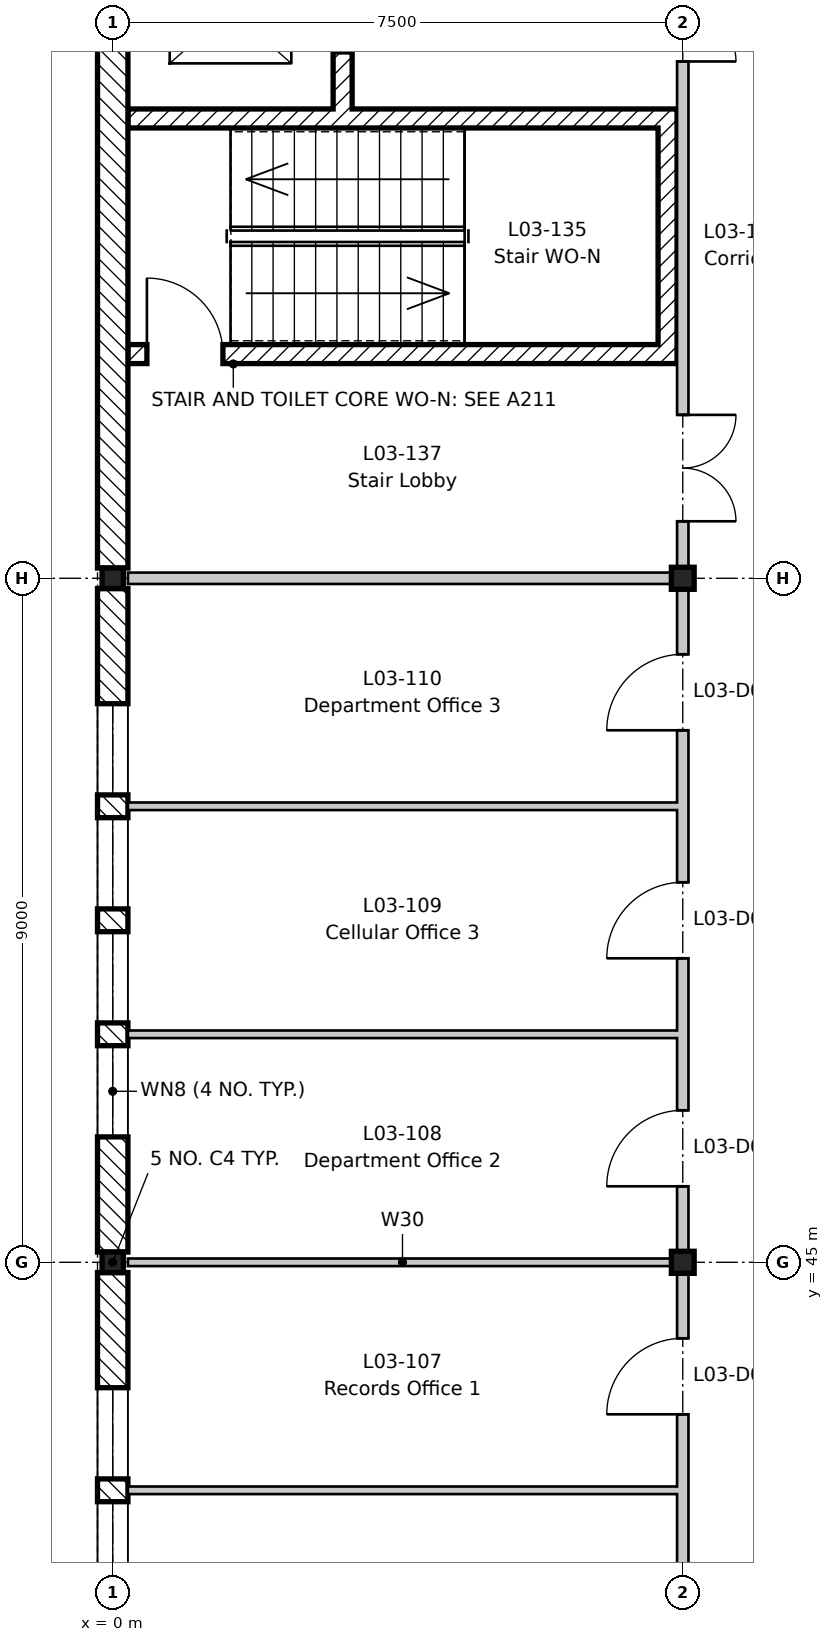
"""IFC4 building model, lengths in metres.
Left out: names, types, materials, properties, quantities, classifications, styles, units other than length and angle.
Written with IfcOpenShell. Run it as: python <this file> out.ifc"""

import sys

from ifc_helpers import new_model, si_unit, direction, frame, frame_2d, origin, origin_2d, place, context, subcontext, project, spatial, rectangle, i_section, extrude, element, fill, save


model = new_model("IFC4")
c1 = context("Model", 3, precision=1e-05, world=origin(), true_north=direction((0.0, 1.0)))
c2 = subcontext(c1, "Body", "Model", "MODEL_VIEW")
j1 = project(units=[si_unit("LENGTHUNIT", "METRE"), si_unit("PLANEANGLEUNIT", "RADIAN")], contexts=[c1])
p1 = place(None, origin())
s1 = spatial("IfcSite", under=j1, at=p1, CompositionType="ELEMENT")
p2 = place(p1, origin())
s2 = spatial("IfcBuilding", under=s1, at=p2, CompositionType="ELEMENT")
p3 = place(p2, frame((0.0, 0.0, 14.4)))
s3 = spatial("IfcBuildingStorey", under=s2, at=p3, CompositionType="ELEMENT", Elevation=14.4)
for number, where, z_axis, x_axis in (
    (1, (0.0, 45.0, -0.2), (0.0, 0.0, 1.0), (1.0, 0.0, 0.0)),
    (2, (0.0, 54.0, -0.2), (0.0, 0.0, 1.0), (1.0, 0.0, 0.0)),
):
    element("IfcColumn", number, at=place(p3, frame(where, z_axis=z_axis, x_axis=x_axis)), inside=s3, PredefinedType="COLUMN", context=c2, shape_type="SweptSolid", body=[
        extrude(i_section(OverallWidth=0.28, OverallDepth=0.27, WebThickness=0.008, FlangeThickness=0.013, FilletRadius=0.024, at=origin_2d()), origin(), (0.0, 0.0, 1.0), 4.2),
    ])
for number, where, z_axis, x_axis in (
    (3, (7.5, 45.0, -0.2), (0.0, 0.0, 1.0), (1.0, 0.0, 0.0)),
    (4, (7.5, 54.0, -0.2), (0.0, 0.0, 1.0), (1.0, 0.0, 0.0)),
):
    element("IfcColumn", number, at=place(p3, frame(where, z_axis=z_axis, x_axis=x_axis)), inside=s3, PredefinedType="COLUMN", context=c2, shape_type="SweptSolid", body=[
        extrude(i_section(OverallWidth=0.3, OverallDepth=0.29, WebThickness=0.009, FlangeThickness=0.014, FilletRadius=0.027, at=origin_2d()), origin(), (0.0, 0.0, 1.0), 4.2),
    ])
p4 = place(p3, frame((0.2, 56.95, 0.0), z_axis=(0.0, 0.0, 1.0), x_axis=(1.0, 0.0, 0.0)))
e5 = element("IfcWall", 5, at=p4, inside=s3, PredefinedType="SHEAR", context=c2, shape_type="SweptSolid", body=[
    extrude(rectangle(XDim=7.225, YDim=0.25, at=frame_2d((3.613, 0.0))), origin(), (0.0, 0.0, 1.0), 4.0),
])
p5 = place(p4, frame((0.25, 0.0, 0.0)))
e6 = element("IfcOpeningElement", 6, at=p5, cuts=e5, PredefinedType="OPENING", context=c2, shape_type="SweptSolid", body=[
    extrude(rectangle(XDim=1.0, YDim=2.1, at=frame_2d((0.5, 1.05))), frame((0.0, 0.135, 0.0), z_axis=(0.0, -1.0, 0.0), x_axis=(1.0, 0.0, 0.0)), (0.0, 0.0, 1.0), 0.27),
])
p6 = place(p3, frame((0.2, 60.05, 0.0), z_axis=(0.0, 0.0, 1.0), x_axis=(1.0, 0.0, 0.0)))
e7 = element("IfcWall", 7, at=p6, inside=s3, PredefinedType="SHEAR", context=c2, shape_type="SweptSolid", body=[
    extrude(rectangle(XDim=7.225, YDim=0.25, at=frame_2d((3.613, 0.0))), origin(), (0.0, 0.0, 1.0), 4.0),
])
p7 = place(p3, frame((7.3, 57.075, 0.0), z_axis=(0.0, 0.0, 1.0), x_axis=(0.0, 1.0, 0.0)))
e8 = element("IfcWall", 8, at=p7, inside=s3, PredefinedType="SHEAR", context=c2, shape_type="SweptSolid", body=[
    extrude(rectangle(XDim=2.85, YDim=0.25, at=frame_2d((1.425, 0.0))), origin(), (0.0, 0.0, 1.0), 4.0),
])
p8 = place(p3, frame((3.025, 60.175, 0.0), z_axis=(0.0, 0.0, 1.0), x_axis=(0.0, 1.0, 0.0)))
e9 = element("IfcWall", 9, at=p8, inside=s3, PredefinedType="SHEAR", context=c2, shape_type="SweptSolid", body=[
    extrude(rectangle(XDim=2.6, YDim=0.25, at=frame_2d((1.3, 0.0))), origin(), (0.0, 0.0, 1.0), 4.0),
])
p9 = place(p8, frame((0.75, 0.0, 0.0)))
e10 = element("IfcOpeningElement", 10, at=p9, cuts=e9, PredefinedType="OPENING", context=c2, shape_type="SweptSolid", body=[
    extrude(rectangle(XDim=1.1, YDim=2.1, at=frame_2d((0.55, 1.05))), frame((0.0, 0.135, 0.0), z_axis=(0.0, -1.0, 0.0), x_axis=(1.0, 0.0, 0.0)), (0.0, 0.0, 1.0), 0.27),
])
p10 = place(p3, frame((0.0, 36.135, 0.0), z_axis=(0.0, 0.0, 1.0), x_axis=(0.0, 1.0, 0.0)))
e11 = element("IfcWall", 11, at=p10, inside=s3, PredefinedType="STANDARD", context=c2, shape_type="SweptSolid", body=[
    extrude(rectangle(XDim=8.73, YDim=0.4, at=frame_2d((4.365, 0.0))), origin(), (0.0, 0.0, 1.0), 3.6),
])
p11 = place(p10, frame((1.515, 0.0, 0.6)))
e12 = element("IfcOpeningElement", 12, at=p11, cuts=e11, PredefinedType="OPENING", context=c2, shape_type="SweptSolid", body=[
    extrude(rectangle(XDim=1.2, YDim=2.7, at=frame_2d((0.6, 1.35))), frame((0.0, 0.21, 0.0), z_axis=(0.0, -1.0, 0.0), x_axis=(1.0, 0.0, 0.0)), (0.0, 0.0, 1.0), 0.42),
])
p12 = place(p10, frame((3.015, 0.0, 0.6)))
e13 = element("IfcOpeningElement", 13, at=p12, cuts=e11, PredefinedType="OPENING", context=c2, shape_type="SweptSolid", body=[
    extrude(rectangle(XDim=1.2, YDim=2.7, at=frame_2d((0.6, 1.35))), frame((0.0, 0.21, 0.0), z_axis=(0.0, -1.0, 0.0), x_axis=(1.0, 0.0, 0.0)), (0.0, 0.0, 1.0), 0.42),
])
p13 = place(p10, frame((4.515, 0.0, 0.6)))
e14 = element("IfcOpeningElement", 14, at=p13, cuts=e11, PredefinedType="OPENING", context=c2, shape_type="SweptSolid", body=[
    extrude(rectangle(XDim=1.2, YDim=2.7, at=frame_2d((0.6, 1.35))), frame((0.0, 0.21, 0.0), z_axis=(0.0, -1.0, 0.0), x_axis=(1.0, 0.0, 0.0)), (0.0, 0.0, 1.0), 0.42),
])
p14 = place(p10, frame((6.015, 0.0, 0.6)))
e15 = element("IfcOpeningElement", 15, at=p14, cuts=e11, PredefinedType="OPENING", context=c2, shape_type="SweptSolid", body=[
    extrude(rectangle(XDim=1.2, YDim=2.7, at=frame_2d((0.6, 1.35))), frame((0.0, 0.21, 0.0), z_axis=(0.0, -1.0, 0.0), x_axis=(1.0, 0.0, 0.0)), (0.0, 0.0, 1.0), 0.42),
])
p15 = place(p3, frame((0.0, 45.135, 0.0), z_axis=(0.0, 0.0, 1.0), x_axis=(0.0, 1.0, 0.0)))
e16 = element("IfcWall", 16, at=p15, inside=s3, PredefinedType="STANDARD", context=c2, shape_type="SweptSolid", body=[
    extrude(rectangle(XDim=8.73, YDim=0.4, at=frame_2d((4.365, 0.0))), origin(), (0.0, 0.0, 1.0), 3.6),
])
p16 = place(p15, frame((1.515, 0.0, 0.6)))
e17 = element("IfcOpeningElement", 17, at=p16, cuts=e16, PredefinedType="OPENING", context=c2, shape_type="SweptSolid", body=[
    extrude(rectangle(XDim=1.2, YDim=2.7, at=frame_2d((0.6, 1.35))), frame((0.0, 0.21, 0.0), z_axis=(0.0, -1.0, 0.0), x_axis=(1.0, 0.0, 0.0)), (0.0, 0.0, 1.0), 0.42),
])
p17 = place(p15, frame((3.015, 0.0, 0.6)))
e18 = element("IfcOpeningElement", 18, at=p17, cuts=e16, PredefinedType="OPENING", context=c2, shape_type="SweptSolid", body=[
    extrude(rectangle(XDim=1.2, YDim=2.7, at=frame_2d((0.6, 1.35))), frame((0.0, 0.21, 0.0), z_axis=(0.0, -1.0, 0.0), x_axis=(1.0, 0.0, 0.0)), (0.0, 0.0, 1.0), 0.42),
])
p18 = place(p15, frame((4.515, 0.0, 0.6)))
e19 = element("IfcOpeningElement", 19, at=p18, cuts=e16, PredefinedType="OPENING", context=c2, shape_type="SweptSolid", body=[
    extrude(rectangle(XDim=1.2, YDim=2.7, at=frame_2d((0.6, 1.35))), frame((0.0, 0.21, 0.0), z_axis=(0.0, -1.0, 0.0), x_axis=(1.0, 0.0, 0.0)), (0.0, 0.0, 1.0), 0.42),
])
p19 = place(p15, frame((6.015, 0.0, 0.6)))
e20 = element("IfcOpeningElement", 20, at=p19, cuts=e16, PredefinedType="OPENING", context=c2, shape_type="SweptSolid", body=[
    extrude(rectangle(XDim=1.2, YDim=2.7, at=frame_2d((0.6, 1.35))), frame((0.0, 0.21, 0.0), z_axis=(0.0, -1.0, 0.0), x_axis=(1.0, 0.0, 0.0)), (0.0, 0.0, 1.0), 0.42),
])
p20 = place(p3, frame((0.0, 54.135, 0.0), z_axis=(0.0, 0.0, 1.0), x_axis=(0.0, 1.0, 0.0)))
e21 = element("IfcWall", 21, at=p20, inside=s3, PredefinedType="STANDARD", context=c2, shape_type="SweptSolid", body=[
    extrude(rectangle(XDim=8.73, YDim=0.4, at=frame_2d((4.365, 0.0))), origin(), (0.0, 0.0, 1.0), 3.6),
])
p21 = place(p3, frame((0.2, 42.0, 0.0), z_axis=(0.0, 0.0, 1.0), x_axis=(1.0, 0.0, 0.0)))
e22 = element("IfcWall", 22, at=p21, inside=s3, PredefinedType="PARTITIONING", context=c2, shape_type="SweptSolid", body=[
    extrude(rectangle(XDim=7.225, YDim=0.1, at=frame_2d((3.613, 0.0))), origin(), (0.0, 0.0, 1.0), 4.0),
])
p22 = place(p3, frame((0.2, 45.0, 0.0), z_axis=(0.0, 0.0, 1.0), x_axis=(1.0, 0.0, 0.0)))
e23 = element("IfcWall", 23, at=p22, inside=s3, PredefinedType="PARTITIONING", context=c2, shape_type="SweptSolid", body=[
    extrude(rectangle(XDim=7.225, YDim=0.1, at=frame_2d((3.613, 0.0))), origin(), (0.0, 0.0, 1.0), 3.65),
])
for number, where, z_axis, x_axis in (
    (24, (0.2, 48.0, 0.0), (0.0, 0.0, 1.0), (1.0, 0.0, 0.0)),
    (25, (0.2, 51.0, 0.0), (0.0, 0.0, 1.0), (1.0, 0.0, 0.0)),
):
    element("IfcWall", number, at=place(p3, frame(where, z_axis=z_axis, x_axis=x_axis)), inside=s3, PredefinedType="PARTITIONING", context=c2, shape_type="SweptSolid", body=[
        extrude(rectangle(XDim=7.225, YDim=0.1, at=frame_2d((3.613, 0.0))), origin(), (0.0, 0.0, 1.0), 4.0),
    ])
p23 = place(p3, frame((0.2, 54.0, 0.0), z_axis=(0.0, 0.0, 1.0), x_axis=(1.0, 0.0, 0.0)))
e26 = element("IfcWall", 26, at=p23, inside=s3, PredefinedType="PARTITIONING", context=c2, shape_type="SweptSolid", body=[
    extrude(rectangle(XDim=7.225, YDim=0.15, at=frame_2d((3.613, 0.0))), origin(), (0.0, 0.0, 1.0), 3.65),
])
p24 = place(p3, frame((7.5, -8.8, 0.0), z_axis=(0.0, 0.0, 1.0), x_axis=(0.0, 1.0, 0.0)))
e27 = element("IfcWall", 27, at=p24, inside=s3, PredefinedType="PARTITIONING", context=c2, shape_type="SweptSolid", body=[
    extrude(rectangle(XDim=79.3, YDim=0.15, at=frame_2d((39.65, 0.0))), origin(), (0.0, 0.0, 1.0), 3.48),
])
p25 = place(p24, frame((18.8, 0.0, 0.0)))
e28 = element("IfcOpeningElement", 28, at=p25, cuts=e27, PredefinedType="OPENING", context=c2, shape_type="SweptSolid", body=[
    extrude(rectangle(XDim=1.0, YDim=2.1, at=frame_2d((0.5, 1.05))), frame((0.0, 0.085, 0.0), z_axis=(0.0, -1.0, 0.0), x_axis=(1.0, 0.0, 0.0)), (0.0, 0.0, 1.0), 0.17),
])
p26 = place(p24, frame((23.3, 0.0, 0.0)))
e29 = element("IfcOpeningElement", 29, at=p26, cuts=e27, PredefinedType="OPENING", context=c2, shape_type="SweptSolid", body=[
    extrude(rectangle(XDim=1.0, YDim=2.1, at=frame_2d((0.5, 1.05))), frame((0.0, 0.085, 0.0), z_axis=(0.0, -1.0, 0.0), x_axis=(1.0, 0.0, 0.0)), (0.0, 0.0, 1.0), 0.17),
])
p27 = place(p24, frame((27.8, 0.0, 0.0)))
e30 = element("IfcOpeningElement", 30, at=p27, cuts=e27, PredefinedType="OPENING", context=c2, shape_type="SweptSolid", body=[
    extrude(rectangle(XDim=1.0, YDim=2.1, at=frame_2d((0.5, 1.05))), frame((0.0, 0.085, 0.0), z_axis=(0.0, -1.0, 0.0), x_axis=(1.0, 0.0, 0.0)), (0.0, 0.0, 1.0), 0.17),
])
p28 = place(p24, frame((30.8, 0.0, 0.0)))
e31 = element("IfcOpeningElement", 31, at=p28, cuts=e27, PredefinedType="OPENING", context=c2, shape_type="SweptSolid", body=[
    extrude(rectangle(XDim=1.0, YDim=2.1, at=frame_2d((0.5, 1.05))), frame((0.0, 0.085, 0.0), z_axis=(0.0, -1.0, 0.0), x_axis=(1.0, 0.0, 0.0)), (0.0, 0.0, 1.0), 0.17),
])
p29 = place(p24, frame((33.8, 0.0, 0.0)))
e32 = element("IfcOpeningElement", 32, at=p29, cuts=e27, PredefinedType="OPENING", context=c2, shape_type="SweptSolid", body=[
    extrude(rectangle(XDim=1.0, YDim=2.1, at=frame_2d((0.5, 1.05))), frame((0.0, 0.085, 0.0), z_axis=(0.0, -1.0, 0.0), x_axis=(1.0, 0.0, 0.0)), (0.0, 0.0, 1.0), 0.17),
])
p30 = place(p24, frame((47.3, 0.0, 0.0)))
e33 = element("IfcOpeningElement", 33, at=p30, cuts=e27, PredefinedType="OPENING", context=c2, shape_type="SweptSolid", body=[
    extrude(rectangle(XDim=1.0, YDim=2.1, at=frame_2d((0.5, 1.05))), frame((0.0, 0.085, 0.0), z_axis=(0.0, -1.0, 0.0), x_axis=(1.0, 0.0, 0.0)), (0.0, 0.0, 1.0), 0.17),
])
p31 = place(p24, frame((51.8, 0.0, 0.0)))
e34 = element("IfcOpeningElement", 34, at=p31, cuts=e27, PredefinedType="OPENING", context=c2, shape_type="SweptSolid", body=[
    extrude(rectangle(XDim=1.0, YDim=2.1, at=frame_2d((0.5, 1.05))), frame((0.0, 0.085, 0.0), z_axis=(0.0, -1.0, 0.0), x_axis=(1.0, 0.0, 0.0)), (0.0, 0.0, 1.0), 0.17),
])
p32 = place(p24, frame((54.8, 0.0, 0.0)))
e35 = element("IfcOpeningElement", 35, at=p32, cuts=e27, PredefinedType="OPENING", context=c2, shape_type="SweptSolid", body=[
    extrude(rectangle(XDim=1.0, YDim=2.1, at=frame_2d((0.5, 1.05))), frame((0.0, 0.085, 0.0), z_axis=(0.0, -1.0, 0.0), x_axis=(1.0, 0.0, 0.0)), (0.0, 0.0, 1.0), 0.17),
])
p33 = place(p24, frame((57.8, 0.0, 0.0)))
e36 = element("IfcOpeningElement", 36, at=p33, cuts=e27, PredefinedType="OPENING", context=c2, shape_type="SweptSolid", body=[
    extrude(rectangle(XDim=1.0, YDim=2.1, at=frame_2d((0.5, 1.05))), frame((0.0, 0.085, 0.0), z_axis=(0.0, -1.0, 0.0), x_axis=(1.0, 0.0, 0.0)), (0.0, 0.0, 1.0), 0.17),
])
p34 = place(p24, frame((60.8, 0.0, 0.0)))
e37 = element("IfcOpeningElement", 37, at=p34, cuts=e27, PredefinedType="OPENING", context=c2, shape_type="SweptSolid", body=[
    extrude(rectangle(XDim=1.0, YDim=2.1, at=frame_2d((0.5, 1.05))), frame((0.0, 0.085, 0.0), z_axis=(0.0, -1.0, 0.0), x_axis=(1.0, 0.0, 0.0)), (0.0, 0.0, 1.0), 0.17),
])
p35 = place(p24, frame((12.6, 0.0, 0.0)))
e38 = element("IfcOpeningElement", 38, at=p35, cuts=e27, PredefinedType="OPENING", context=c2, shape_type="SweptSolid", body=[
    extrude(rectangle(XDim=1.4, YDim=2.1, at=frame_2d((0.7, 1.05))), frame((0.0, 0.085, 0.0), z_axis=(0.0, -1.0, 0.0), x_axis=(1.0, 0.0, 0.0)), (0.0, 0.0, 1.0), 0.17),
])
p36 = place(p24, frame((3.6, 0.0, 0.0)))
e39 = element("IfcOpeningElement", 39, at=p36, cuts=e27, PredefinedType="OPENING", context=c2, shape_type="SweptSolid", body=[
    extrude(rectangle(XDim=1.4, YDim=2.1, at=frame_2d((0.7, 1.05))), frame((0.0, 0.085, 0.0), z_axis=(0.0, -1.0, 0.0), x_axis=(1.0, 0.0, 0.0)), (0.0, 0.0, 1.0), 0.17),
])
p37 = place(p24, frame((63.55, 0.0, 0.0)))
e40 = element("IfcOpeningElement", 40, at=p37, cuts=e27, PredefinedType="OPENING", context=c2, shape_type="SweptSolid", body=[
    extrude(rectangle(XDim=1.4, YDim=2.1, at=frame_2d((0.7, 1.05))), frame((0.0, 0.085, 0.0), z_axis=(0.0, -1.0, 0.0), x_axis=(1.0, 0.0, 0.0)), (0.0, 0.0, 1.0), 0.17),
])
p38 = place(p24, frame((69.6, 0.0, 0.0)))
e41 = element("IfcOpeningElement", 41, at=p38, cuts=e27, PredefinedType="OPENING", context=c2, shape_type="SweptSolid", body=[
    extrude(rectangle(XDim=1.4, YDim=2.1, at=frame_2d((0.7, 1.05))), frame((0.0, 0.085, 0.0), z_axis=(0.0, -1.0, 0.0), x_axis=(1.0, 0.0, 0.0)), (0.0, 0.0, 1.0), 0.17),
])
p39 = place(p24, frame((42.85, 0.0, 0.0)))
e42 = element("IfcOpeningElement", 42, at=p39, cuts=e27, PredefinedType="OPENING", context=c2, shape_type="SweptSolid", body=[
    extrude(rectangle(XDim=1.0, YDim=2.1, at=frame_2d((0.5, 1.05))), frame((0.0, 0.085, 0.0), z_axis=(0.0, -1.0, 0.0), x_axis=(1.0, 0.0, 0.0)), (0.0, 0.0, 1.0), 0.17),
])
p40 = place(p24, frame((36.55, 0.0, 0.0)))
e43 = element("IfcOpeningElement", 43, at=p40, cuts=e27, PredefinedType="OPENING", context=c2, shape_type="SweptSolid", body=[
    extrude(rectangle(XDim=1.4, YDim=2.1, at=frame_2d((0.7, 1.05))), frame((0.0, 0.085, 0.0), z_axis=(0.0, -1.0, 0.0), x_axis=(1.0, 0.0, 0.0)), (0.0, 0.0, 1.0), 0.17),
])
p41 = place(p24, frame((72.8, 0.0, 0.0)))
e44 = element("IfcOpeningElement", 44, at=p41, cuts=e27, PredefinedType="OPENING", context=c2, shape_type="SweptSolid", body=[
    extrude(rectangle(XDim=1.0, YDim=2.1, at=frame_2d((0.5, 1.05))), frame((0.0, 0.085, 0.0), z_axis=(0.0, -1.0, 0.0), x_axis=(1.0, 0.0, 0.0)), (0.0, 0.0, 1.0), 0.17),
])
p42 = place(p13, origin())
e45 = element("IfcWindow", 45, at=p42, inside=s3, PartitioningType="SINGLE_PANEL", PredefinedType="WINDOW", context=c2, shape_type="SweptSolid", body=[
    extrude(rectangle(XDim=1.2, YDim=2.7, at=frame_2d((0.6, 1.35))), frame((0.0, 0.03, 0.0), z_axis=(0.0, -1.0, 0.0), x_axis=(1.0, 0.0, 0.0)), (0.0, 0.0, 1.0), 0.06),
])
fill(e14, e45)
p43 = place(p14, origin())
e46 = element("IfcWindow", 46, at=p43, inside=s3, PartitioningType="SINGLE_PANEL", PredefinedType="WINDOW", context=c2, shape_type="SweptSolid", body=[
    extrude(rectangle(XDim=1.2, YDim=2.7, at=frame_2d((0.6, 1.35))), frame((0.0, 0.03, 0.0), z_axis=(0.0, -1.0, 0.0), x_axis=(1.0, 0.0, 0.0)), (0.0, 0.0, 1.0), 0.06),
])
fill(e15, e46)
p44 = place(p16, origin())
e47 = element("IfcWindow", 47, at=p44, inside=s3, PartitioningType="SINGLE_PANEL", PredefinedType="WINDOW", context=c2, shape_type="SweptSolid", body=[
    extrude(rectangle(XDim=1.2, YDim=2.7, at=frame_2d((0.6, 1.35))), frame((0.0, 0.03, 0.0), z_axis=(0.0, -1.0, 0.0), x_axis=(1.0, 0.0, 0.0)), (0.0, 0.0, 1.0), 0.06),
])
fill(e17, e47)
p45 = place(p17, origin())
e48 = element("IfcWindow", 48, at=p45, inside=s3, PartitioningType="SINGLE_PANEL", PredefinedType="WINDOW", context=c2, shape_type="SweptSolid", body=[
    extrude(rectangle(XDim=1.2, YDim=2.7, at=frame_2d((0.6, 1.35))), frame((0.0, 0.03, 0.0), z_axis=(0.0, -1.0, 0.0), x_axis=(1.0, 0.0, 0.0)), (0.0, 0.0, 1.0), 0.06),
])
fill(e18, e48)
p46 = place(p18, origin())
e49 = element("IfcWindow", 49, at=p46, inside=s3, PartitioningType="SINGLE_PANEL", PredefinedType="WINDOW", context=c2, shape_type="SweptSolid", body=[
    extrude(rectangle(XDim=1.2, YDim=2.7, at=frame_2d((0.6, 1.35))), frame((0.0, 0.03, 0.0), z_axis=(0.0, -1.0, 0.0), x_axis=(1.0, 0.0, 0.0)), (0.0, 0.0, 1.0), 0.06),
])
fill(e19, e49)
p47 = place(p19, origin())
e50 = element("IfcWindow", 50, at=p47, inside=s3, PartitioningType="SINGLE_PANEL", PredefinedType="WINDOW", context=c2, shape_type="SweptSolid", body=[
    extrude(rectangle(XDim=1.2, YDim=2.7, at=frame_2d((0.6, 1.35))), frame((0.0, 0.03, 0.0), z_axis=(0.0, -1.0, 0.0), x_axis=(1.0, 0.0, 0.0)), (0.0, 0.0, 1.0), 0.06),
])
fill(e20, e50)
p48 = place(p31, origin())
e51 = element("IfcDoor", 51, at=p48, inside=s3, OperationType="SINGLE_SWING_LEFT", PredefinedType="DOOR", context=c2, shape_type="SweptSolid", body=[
    extrude(rectangle(XDim=1.0, YDim=2.1, at=frame_2d((0.5, 1.05))), frame((0.0, 0.025, 0.0), z_axis=(0.0, -1.0, 0.0), x_axis=(1.0, 0.0, 0.0)), (0.0, 0.0, 1.0), 0.05),
])
fill(e34, e51)
p49 = place(p32, origin())
e52 = element("IfcDoor", 52, at=p49, inside=s3, OperationType="SINGLE_SWING_LEFT", PredefinedType="DOOR", context=c2, shape_type="SweptSolid", body=[
    extrude(rectangle(XDim=1.0, YDim=2.1, at=frame_2d((0.5, 1.05))), frame((0.0, 0.025, 0.0), z_axis=(0.0, -1.0, 0.0), x_axis=(1.0, 0.0, 0.0)), (0.0, 0.0, 1.0), 0.05),
])
fill(e35, e52)
p50 = place(p33, origin())
e53 = element("IfcDoor", 53, at=p50, inside=s3, OperationType="SINGLE_SWING_LEFT", PredefinedType="DOOR", context=c2, shape_type="SweptSolid", body=[
    extrude(rectangle(XDim=1.0, YDim=2.1, at=frame_2d((0.5, 1.05))), frame((0.0, 0.025, 0.0), z_axis=(0.0, -1.0, 0.0), x_axis=(1.0, 0.0, 0.0)), (0.0, 0.0, 1.0), 0.05),
])
fill(e36, e53)
p51 = place(p34, origin())
e54 = element("IfcDoor", 54, at=p51, inside=s3, OperationType="SINGLE_SWING_LEFT", PredefinedType="DOOR", context=c2, shape_type="SweptSolid", body=[
    extrude(rectangle(XDim=1.0, YDim=2.1, at=frame_2d((0.5, 1.05))), frame((0.0, 0.025, 0.0), z_axis=(0.0, -1.0, 0.0), x_axis=(1.0, 0.0, 0.0)), (0.0, 0.0, 1.0), 0.05),
])
fill(e37, e54)
p52 = place(p5, origin())
e55 = element("IfcDoor", 55, at=p52, inside=s3, OperationType="SINGLE_SWING_LEFT", PredefinedType="DOOR", context=c2, shape_type="SweptSolid", body=[
    extrude(rectangle(XDim=1.0, YDim=2.1, at=frame_2d((0.5, 1.05))), frame((0.0, 0.025, 0.0), z_axis=(0.0, -1.0, 0.0), x_axis=(1.0, 0.0, 0.0)), (0.0, 0.0, 1.0), 0.05),
])
fill(e6, e55)
p53 = place(p37, frame((1.4, 0.0, 0.0), z_axis=(0.0, 0.0, 1.0), x_axis=(-1.0, 0.0, 0.0)))
e56 = element("IfcDoor", 56, at=p53, inside=s3, OperationType="DOUBLE_DOOR_SINGLE_SWING", PredefinedType="DOOR", context=c2, shape_type="SweptSolid", body=[
    extrude(rectangle(XDim=1.4, YDim=2.1, at=frame_2d((0.7, 1.05))), frame((0.0, 0.025, 0.0), z_axis=(0.0, -1.0, 0.0), x_axis=(1.0, 0.0, 0.0)), (0.0, 0.0, 1.0), 0.05),
])
fill(e40, e56)
p54 = place(p38, frame((1.4, 0.0, 0.0), z_axis=(0.0, 0.0, 1.0), x_axis=(-1.0, 0.0, 0.0)))
e57 = element("IfcDoor", 57, at=p54, inside=s3, OperationType="DOUBLE_DOOR_SINGLE_SWING", PredefinedType="DOOR", context=c2, shape_type="SweptSolid", body=[
    extrude(rectangle(XDim=1.4, YDim=2.1, at=frame_2d((0.7, 1.05))), frame((0.0, 0.025, 0.0), z_axis=(0.0, -1.0, 0.0), x_axis=(1.0, 0.0, 0.0)), (0.0, 0.0, 1.0), 0.05),
])
fill(e41, e57)
save(model, sys.argv[1])
